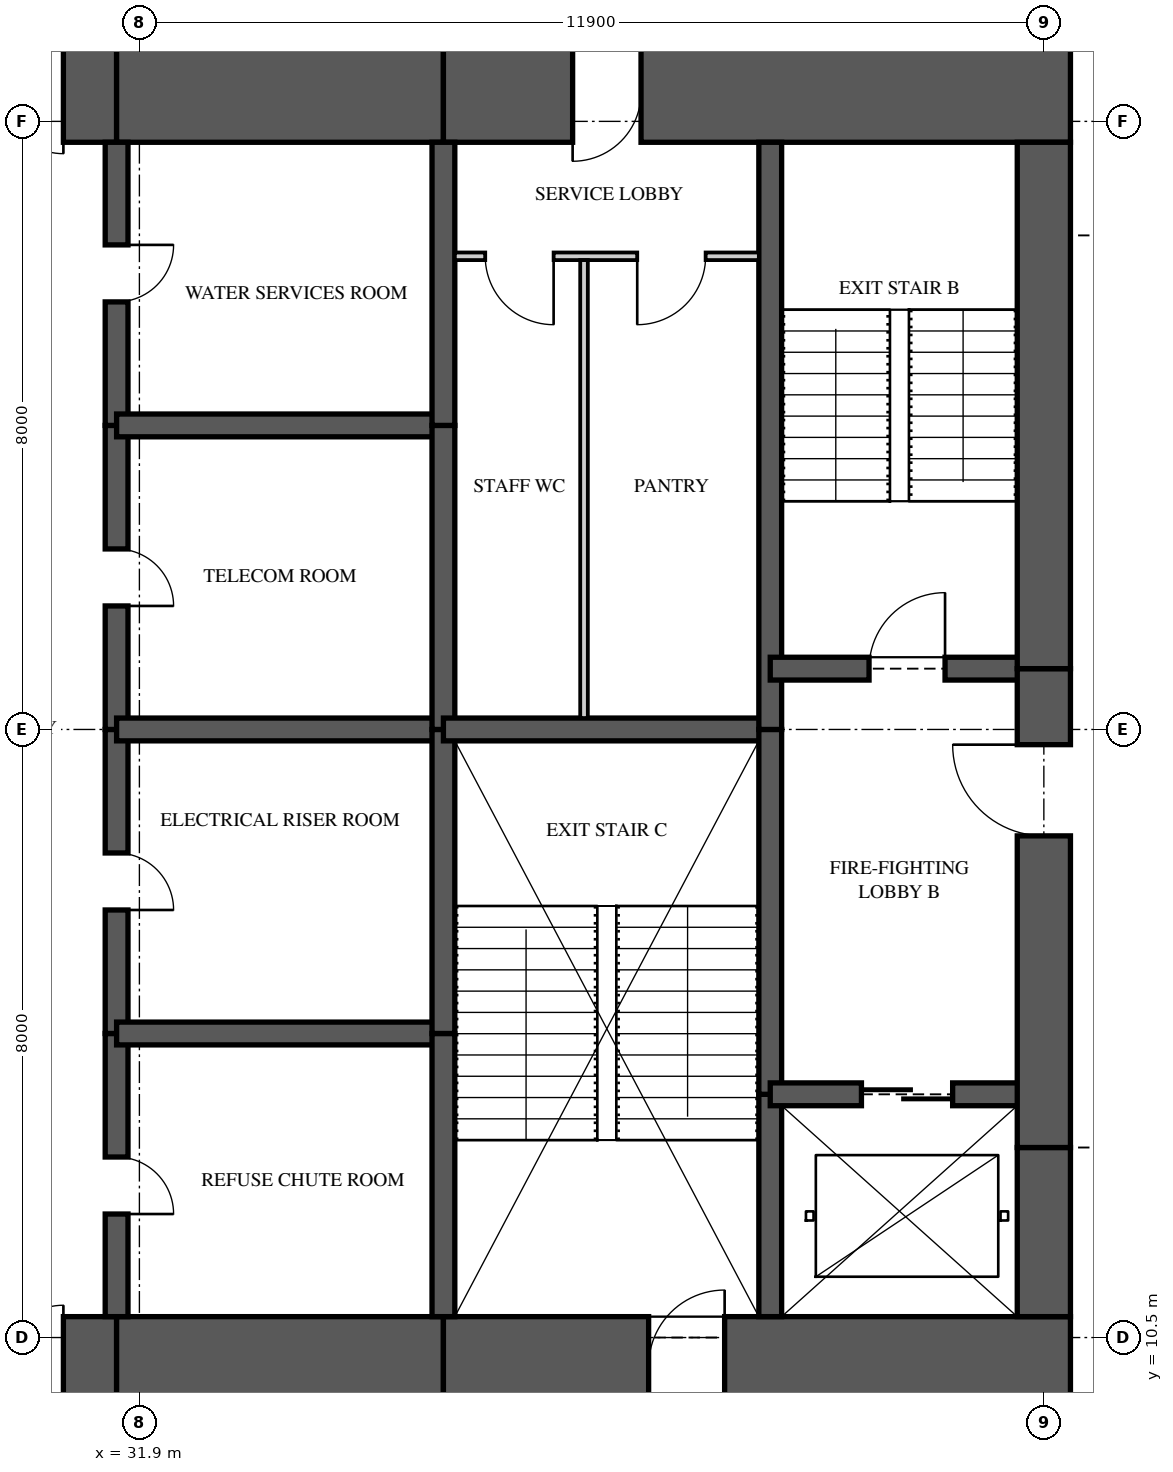
"""IFC4 building model, lengths in metres.
Left out: names, types, materials, properties, quantities, classifications, styles, units other than length and angle.
Written with IfcOpenShell. Run it as: python <this file> out.ifc"""

import sys

from ifc_helpers import new_model, si_unit, direction, frame, frame_2d, origin, place, context, subcontext, project, spatial, rectangle, extrude, element, fill, save


model = new_model("IFC4")
c1 = context("Model", 3, precision=1e-05, world=origin(), true_north=direction((0.0, 1.0)))
c2 = subcontext(c1, "Body", "Model", "MODEL_VIEW")
j1 = project(units=[si_unit("LENGTHUNIT", "METRE"), si_unit("PLANEANGLEUNIT", "RADIAN")], contexts=[c1])
p1 = place(None, origin())
s1 = spatial("IfcSite", under=j1, at=p1, CompositionType="ELEMENT")
p2 = place(p1, origin())
s2 = spatial("IfcBuilding", under=s1, at=p2, CompositionType="ELEMENT")
p3 = place(p2, frame((0.0, 0.0, 154.35)))
s3 = spatial("IfcBuildingStorey", under=s2, at=p3, CompositionType="ELEMENT", Elevation=154.35)
p4 = place(p3, frame((26.0, 10.125, 0.0), z_axis=(0.0, 0.0, 1.0), x_axis=(1.0, 0.0, 0.0)))
e1 = element("IfcWall", 1, at=p4, inside=s3, PredefinedType="SHEAR", context=c2, shape_type="SweptSolid", body=[
    extrude(rectangle(XDim=5.6, YDim=1.3, at=frame_2d((2.8, 0.0))), origin(), (0.0, 0.0, 1.0), 3.35),
])
p5 = place(p4, frame((3.3, 0.0, 0.0)))
e2 = element("IfcOpeningElement", 2, at=p5, cuts=e1, PredefinedType="OPENING", context=c2, shape_type="SweptSolid", body=[
    extrude(rectangle(XDim=1.6, YDim=2.1, at=frame_2d((0.8, 1.05))), frame((0.0, 0.66, 0.0), z_axis=(0.0, -1.0, 0.0), x_axis=(1.0, 0.0, 0.0)), (0.0, 0.0, 1.0), 1.32),
])
p6 = place(p3, frame((31.6, 10.125, 0.0), z_axis=(0.0, 0.0, 1.0), x_axis=(1.0, 0.0, 0.0)))
e3 = element("IfcWall", 3, at=p6, inside=s3, PredefinedType="SHEAR", context=c2, shape_type="SweptSolid", body=[
    extrude(rectangle(XDim=4.3, YDim=1.3, at=frame_2d((2.15, 0.0))), origin(), (0.0, 0.0, 1.0), 3.35),
])
p7 = place(p3, frame((35.9, 10.125, 0.0), z_axis=(0.0, 0.0, 1.0), x_axis=(1.0, 0.0, 0.0)))
e4 = element("IfcWall", 4, at=p7, inside=s3, PredefinedType="SHEAR", context=c2, shape_type="SweptSolid", body=[
    extrude(rectangle(XDim=8.25, YDim=1.3, at=frame_2d((4.125, 0.0))), origin(), (0.0, 0.0, 1.0), 3.35),
])
p8 = place(p7, frame((2.7, 0.0, 0.0)))
e5 = element("IfcOpeningElement", 5, at=p8, cuts=e4, PredefinedType="OPENING", context=c2, shape_type="SweptSolid", body=[
    extrude(rectangle(XDim=1.0, YDim=2.1, at=frame_2d((0.5, 1.05))), frame((0.0, 0.66, 0.0), z_axis=(0.0, -1.0, 0.0), x_axis=(1.0, 0.0, 0.0)), (0.0, 0.0, 1.0), 1.32),
])
p9 = place(p3, frame((44.15, 26.875, 0.0), z_axis=(0.0, 0.0, 1.0), x_axis=(-1.0, 0.0, 0.0)))
e6 = element("IfcWall", 6, at=p9, inside=s3, PredefinedType="SHEAR", context=c2, shape_type="SweptSolid", body=[
    extrude(rectangle(XDim=8.25, YDim=1.3, at=frame_2d((4.125, 0.0))), origin(), (0.0, 0.0, 1.0), 3.35),
])
p10 = place(p9, frame((5.65, 0.0, 0.0)))
e7 = element("IfcOpeningElement", 7, at=p10, cuts=e6, PredefinedType="OPENING", context=c2, shape_type="SweptSolid", body=[
    extrude(rectangle(XDim=0.9, YDim=2.1, at=frame_2d((0.45, 1.05))), frame((0.0, 0.66, 0.0), z_axis=(0.0, -1.0, 0.0), x_axis=(1.0, 0.0, 0.0)), (0.0, 0.0, 1.0), 1.32),
])
p11 = place(p3, frame((35.9, 26.875, 0.0), z_axis=(0.0, 0.0, 1.0), x_axis=(-1.0, 0.0, 0.0)))
e8 = element("IfcWall", 8, at=p11, inside=s3, PredefinedType="SHEAR", context=c2, shape_type="SweptSolid", body=[
    extrude(rectangle(XDim=4.3, YDim=1.3, at=frame_2d((2.15, 0.0))), origin(), (0.0, 0.0, 1.0), 3.35),
])
p12 = place(p3, frame((31.6, 26.875, 0.0), z_axis=(0.0, 0.0, 1.0), x_axis=(-1.0, 0.0, 0.0)))
e9 = element("IfcWall", 9, at=p12, inside=s3, PredefinedType="SHEAR", context=c2, shape_type="SweptSolid", body=[
    extrude(rectangle(XDim=5.6, YDim=1.3, at=frame_2d((2.8, 0.0))), origin(), (0.0, 0.0, 1.0), 3.35),
])
p13 = place(p12, frame((0.7, 0.0, 0.0)))
e10 = element("IfcOpeningElement", 10, at=p13, cuts=e9, PredefinedType="OPENING", context=c2, shape_type="SweptSolid", body=[
    extrude(rectangle(XDim=1.6, YDim=2.1, at=frame_2d((0.8, 1.05))), frame((0.0, 0.66, 0.0), z_axis=(0.0, -1.0, 0.0), x_axis=(1.0, 0.0, 0.0)), (0.0, 0.0, 1.0), 1.32),
])
p14 = place(p3, frame((43.8, 10.775, 0.0), z_axis=(0.0, 0.0, 1.0), x_axis=(0.0, 1.0, 0.0)))
e11 = element("IfcWall", 11, at=p14, inside=s3, PredefinedType="SHEAR", context=c2, shape_type="SweptSolid", body=[
    extrude(rectangle(XDim=2.225, YDim=0.7, at=frame_2d((1.113, 0.0))), origin(), (0.0, 0.0, 1.0), 3.35),
])
p15 = place(p3, frame((43.8, 13.0, 0.0), z_axis=(0.0, 0.0, 1.0), x_axis=(0.0, 1.0, 0.0)))
e12 = element("IfcWall", 12, at=p15, inside=s3, PredefinedType="SHEAR", context=c2, shape_type="SweptSolid", body=[
    extrude(rectangle(XDim=6.3, YDim=0.7, at=frame_2d((3.15, 0.0))), origin(), (0.0, 0.0, 1.0), 3.35),
])
p16 = place(p15, frame((4.1, 0.0, 0.0)))
e13 = element("IfcOpeningElement", 13, at=p16, cuts=e12, PredefinedType="OPENING", context=c2, shape_type="SweptSolid", body=[
    extrude(rectangle(XDim=1.2, YDim=2.2, at=frame_2d((0.6, 1.1))), frame((0.0, 0.36, 0.0), z_axis=(0.0, -1.0, 0.0), x_axis=(1.0, 0.0, 0.0)), (0.0, 0.0, 1.0), 0.72),
])
p17 = place(p3, frame((43.8, 19.3, 0.0), z_axis=(0.0, 0.0, 1.0), x_axis=(0.0, 1.0, 0.0)))
e14 = element("IfcWall", 14, at=p17, inside=s3, PredefinedType="SHEAR", context=c2, shape_type="SweptSolid", body=[
    extrude(rectangle(XDim=6.925, YDim=0.7, at=frame_2d((3.462, 0.0))), origin(), (0.0, 0.0, 1.0), 3.35),
])
p18 = place(p3, frame((31.6, 10.775, 0.0), z_axis=(0.0, 0.0, 1.0), x_axis=(0.0, 1.0, 0.0)))
e15 = element("IfcWall", 15, at=p18, inside=s3, PredefinedType="SHEAR", context=c2, shape_type="SweptSolid", body=[
    extrude(rectangle(XDim=3.725, YDim=0.3, at=frame_2d((1.863, 0.0))), origin(), (0.0, 0.0, 1.0), 3.35),
])
p19 = place(p18, frame((1.35, 0.0, 0.0)))
e16 = element("IfcOpeningElement", 16, at=p19, cuts=e15, PredefinedType="OPENING", context=c2, shape_type="SweptSolid", body=[
    extrude(rectangle(XDim=0.75, YDim=2.1, at=frame_2d((0.375, 1.05))), frame((0.0, 0.16, 0.0), z_axis=(0.0, -1.0, 0.0), x_axis=(1.0, 0.0, 0.0)), (0.0, 0.0, 1.0), 0.32),
])
p20 = place(p3, frame((31.6, 14.5, 0.0), z_axis=(0.0, 0.0, 1.0), x_axis=(0.0, 1.0, 0.0)))
e17 = element("IfcWall", 17, at=p20, inside=s3, PredefinedType="SHEAR", context=c2, shape_type="SweptSolid", body=[
    extrude(rectangle(XDim=4.0, YDim=0.3, at=frame_2d((2.0, 0.0))), origin(), (0.0, 0.0, 1.0), 3.35),
])
p21 = place(p20, frame((1.625, 0.0, 0.0)))
e18 = element("IfcOpeningElement", 18, at=p21, cuts=e17, PredefinedType="OPENING", context=c2, shape_type="SweptSolid", body=[
    extrude(rectangle(XDim=0.75, YDim=2.1, at=frame_2d((0.375, 1.05))), frame((0.0, 0.16, 0.0), z_axis=(0.0, -1.0, 0.0), x_axis=(1.0, 0.0, 0.0)), (0.0, 0.0, 1.0), 0.32),
])
p22 = place(p3, frame((31.6, 18.5, 0.0), z_axis=(0.0, 0.0, 1.0), x_axis=(0.0, 1.0, 0.0)))
e19 = element("IfcWall", 19, at=p22, inside=s3, PredefinedType="SHEAR", context=c2, shape_type="SweptSolid", body=[
    extrude(rectangle(XDim=4.0, YDim=0.3, at=frame_2d((2.0, 0.0))), origin(), (0.0, 0.0, 1.0), 3.35),
])
p23 = place(p22, frame((1.625, 0.0, 0.0)))
e20 = element("IfcOpeningElement", 20, at=p23, cuts=e19, PredefinedType="OPENING", context=c2, shape_type="SweptSolid", body=[
    extrude(rectangle(XDim=0.75, YDim=2.1, at=frame_2d((0.375, 1.05))), frame((0.0, 0.16, 0.0), z_axis=(0.0, -1.0, 0.0), x_axis=(1.0, 0.0, 0.0)), (0.0, 0.0, 1.0), 0.32),
])
p24 = place(p3, frame((31.6, 22.5, 0.0), z_axis=(0.0, 0.0, 1.0), x_axis=(0.0, 1.0, 0.0)))
e21 = element("IfcWall", 21, at=p24, inside=s3, PredefinedType="SHEAR", context=c2, shape_type="SweptSolid", body=[
    extrude(rectangle(XDim=3.725, YDim=0.3, at=frame_2d((1.863, 0.0))), origin(), (0.0, 0.0, 1.0), 3.35),
])
p25 = place(p24, frame((1.625, 0.0, 0.0)))
e22 = element("IfcOpeningElement", 22, at=p25, cuts=e21, PredefinedType="OPENING", context=c2, shape_type="SweptSolid", body=[
    extrude(rectangle(XDim=0.75, YDim=2.1, at=frame_2d((0.375, 1.05))), frame((0.0, 0.16, 0.0), z_axis=(0.0, -1.0, 0.0), x_axis=(1.0, 0.0, 0.0)), (0.0, 0.0, 1.0), 0.32),
])
p26 = place(p3, frame((35.9, 10.775, 0.0), z_axis=(0.0, 0.0, 1.0), x_axis=(0.0, 1.0, 0.0)))
e23 = element("IfcWall", 23, at=p26, inside=s3, PredefinedType="SHEAR", context=c2, shape_type="SweptSolid", body=[
    extrude(rectangle(XDim=3.725, YDim=0.3, at=frame_2d((1.863, 0.0))), origin(), (0.0, 0.0, 1.0), 3.35),
])
for number, where, z_axis, x_axis in (
    (24, (35.9, 14.5, 0.0), (0.0, 0.0, 1.0), (0.0, 1.0, 0.0)),
    (25, (35.9, 18.5, 0.0), (0.0, 0.0, 1.0), (0.0, 1.0, 0.0)),
):
    element("IfcWall", number, at=place(p3, frame(where, z_axis=z_axis, x_axis=x_axis)), inside=s3, PredefinedType="SHEAR", context=c2, shape_type="SweptSolid", body=[
        extrude(rectangle(XDim=4.0, YDim=0.3, at=frame_2d((2.0, 0.0))), origin(), (0.0, 0.0, 1.0), 3.35),
    ])
p27 = place(p3, frame((35.9, 22.5, 0.0), z_axis=(0.0, 0.0, 1.0), x_axis=(0.0, 1.0, 0.0)))
e26 = element("IfcWall", 26, at=p27, inside=s3, PredefinedType="SHEAR", context=c2, shape_type="SweptSolid", body=[
    extrude(rectangle(XDim=3.725, YDim=0.3, at=frame_2d((1.863, 0.0))), origin(), (0.0, 0.0, 1.0), 3.35),
])
p28 = place(p3, frame((40.2, 10.775, 0.0), z_axis=(0.0, 0.0, 1.0), x_axis=(0.0, 1.0, 0.0)))
e27 = element("IfcWall", 27, at=p28, inside=s3, PredefinedType="SHEAR", context=c2, shape_type="SweptSolid", body=[
    extrude(rectangle(XDim=2.925, YDim=0.3, at=frame_2d((1.462, 0.0))), origin(), (0.0, 0.0, 1.0), 3.35),
])
p29 = place(p3, frame((40.2, 13.7, 0.0), z_axis=(0.0, 0.0, 1.0), x_axis=(0.0, 1.0, 0.0)))
e28 = element("IfcWall", 28, at=p29, inside=s3, PredefinedType="SHEAR", context=c2, shape_type="SweptSolid", body=[
    extrude(rectangle(XDim=4.8, YDim=0.3, at=frame_2d((2.4, 0.0))), origin(), (0.0, 0.0, 1.0), 3.35),
])
p30 = place(p3, frame((40.2, 18.5, 0.0), z_axis=(0.0, 0.0, 1.0), x_axis=(0.0, 1.0, 0.0)))
e29 = element("IfcWall", 29, at=p30, inside=s3, PredefinedType="SHEAR", context=c2, shape_type="SweptSolid", body=[
    extrude(rectangle(XDim=7.725, YDim=0.3, at=frame_2d((3.863, 0.0))), origin(), (0.0, 0.0, 1.0), 3.35),
])
for number, where, z_axis, x_axis in (
    (30, (31.6, 14.5, 0.0), (0.0, 0.0, 1.0), (1.0, 0.0, 0.0)),
    (31, (31.6, 18.5, 0.0), (0.0, 0.0, 1.0), (1.0, 0.0, 0.0)),
    (32, (31.6, 22.5, 0.0), (0.0, 0.0, 1.0), (1.0, 0.0, 0.0)),
):
    element("IfcWall", number, at=place(p3, frame(where, z_axis=z_axis, x_axis=x_axis)), inside=s3, PredefinedType="SHEAR", context=c2, shape_type="SweptSolid", body=[
        extrude(rectangle(XDim=4.3, YDim=0.3, at=frame_2d((2.15, 0.0))), origin(), (0.0, 0.0, 1.0), 3.35),
    ])
p31 = place(p3, frame((35.9, 18.5, 0.0), z_axis=(0.0, 0.0, 1.0), x_axis=(1.0, 0.0, 0.0)))
e33 = element("IfcWall", 33, at=p31, inside=s3, PredefinedType="SHEAR", context=c2, shape_type="SweptSolid", body=[
    extrude(rectangle(XDim=4.3, YDim=0.3, at=frame_2d((2.15, 0.0))), origin(), (0.0, 0.0, 1.0), 3.35),
])
p32 = place(p3, frame((40.2, 13.7, 0.0), z_axis=(0.0, 0.0, 1.0), x_axis=(1.0, 0.0, 0.0)))
e34 = element("IfcWall", 34, at=p32, inside=s3, PredefinedType="SHEAR", context=c2, shape_type="SweptSolid", body=[
    extrude(rectangle(XDim=3.6, YDim=0.3, at=frame_2d((1.8, 0.0))), origin(), (0.0, 0.0, 1.0), 3.35),
])
p33 = place(p32, frame((1.2, 0.0, 0.0)))
e35 = element("IfcOpeningElement", 35, at=p33, cuts=e34, PredefinedType="OPENING", context=c2, shape_type="SweptSolid", body=[
    extrude(rectangle(XDim=1.2, YDim=2.1, at=frame_2d((0.6, 1.05))), frame((0.0, 0.16, 0.0), z_axis=(0.0, -1.0, 0.0), x_axis=(1.0, 0.0, 0.0)), (0.0, 0.0, 1.0), 0.32),
])
p34 = place(p3, frame((40.2, 19.3, 0.0), z_axis=(0.0, 0.0, 1.0), x_axis=(1.0, 0.0, 0.0)))
e36 = element("IfcWall", 36, at=p34, inside=s3, PredefinedType="SHEAR", context=c2, shape_type="SweptSolid", body=[
    extrude(rectangle(XDim=3.6, YDim=0.3, at=frame_2d((1.8, 0.0))), origin(), (0.0, 0.0, 1.0), 3.35),
])
p35 = place(p34, frame((1.3, 0.0, 0.0)))
e37 = element("IfcOpeningElement", 37, at=p35, cuts=e36, PredefinedType="OPENING", context=c2, shape_type="SweptSolid", body=[
    extrude(rectangle(XDim=1.0, YDim=2.1, at=frame_2d((0.5, 1.05))), frame((0.0, 0.16, 0.0), z_axis=(0.0, -1.0, 0.0), x_axis=(1.0, 0.0, 0.0)), (0.0, 0.0, 1.0), 0.32),
])
p36 = place(p3, frame((36.05, 24.725, 0.0), z_axis=(0.0, 0.0, 1.0), x_axis=(1.0, 0.0, 0.0)))
e38 = element("IfcWall", 38, at=p36, inside=s3, PredefinedType="PARTITIONING", context=c2, shape_type="SweptSolid", body=[
    extrude(rectangle(XDim=4.0, YDim=0.1, at=frame_2d((2.0, 0.0))), origin(), (0.0, 0.0, 1.0), 3.11),
])
p37 = place(p36, frame((0.4, 0.0, 0.0)))
e39 = element("IfcOpeningElement", 39, at=p37, cuts=e38, PredefinedType="OPENING", context=c2, shape_type="SweptSolid", body=[
    extrude(rectangle(XDim=0.9, YDim=2.1, at=frame_2d((0.45, 1.05))), frame((0.0, 0.06, 0.0), z_axis=(0.0, -1.0, 0.0), x_axis=(1.0, 0.0, 0.0)), (0.0, 0.0, 1.0), 0.12),
])
p38 = place(p36, frame((2.4, 0.0, 0.0)))
e40 = element("IfcOpeningElement", 40, at=p38, cuts=e38, PredefinedType="OPENING", context=c2, shape_type="SweptSolid", body=[
    extrude(rectangle(XDim=0.9, YDim=2.1, at=frame_2d((0.45, 1.05))), frame((0.0, 0.06, 0.0), z_axis=(0.0, -1.0, 0.0), x_axis=(1.0, 0.0, 0.0)), (0.0, 0.0, 1.0), 0.12),
])
p39 = place(p3, frame((37.75, 18.65, 0.0), z_axis=(0.0, 0.0, 1.0), x_axis=(0.0, 1.0, 0.0)))
e41 = element("IfcWall", 41, at=p39, inside=s3, PredefinedType="PARTITIONING", context=c2, shape_type="SweptSolid", body=[
    extrude(rectangle(XDim=6.025, YDim=0.1, at=frame_2d((3.013, 0.0))), origin(), (0.0, 0.0, 1.0), 3.11),
])
p40 = place(p37, frame((0.9, 0.0, 0.0), z_axis=(0.0, 0.0, 1.0), x_axis=(-1.0, 0.0, 0.0)))
e42 = element("IfcDoor", 42, at=p40, inside=s3, OperationType="SINGLE_SWING_LEFT", PredefinedType="DOOR", context=c2, shape_type="SweptSolid", body=[
    extrude(rectangle(XDim=0.9, YDim=2.1, at=frame_2d((0.45, 1.05))), frame((0.0, 0.025, 0.0), z_axis=(0.0, -1.0, 0.0), x_axis=(1.0, 0.0, 0.0)), (0.0, 0.0, 1.0), 0.05),
])
fill(e39, e42)
p41 = place(p38, frame((0.9, 0.0, 0.0), z_axis=(0.0, 0.0, 1.0), x_axis=(-1.0, 0.0, 0.0)))
e43 = element("IfcDoor", 43, at=p41, inside=s3, OperationType="SINGLE_SWING_RIGHT", PredefinedType="DOOR", context=c2, shape_type="SweptSolid", body=[
    extrude(rectangle(XDim=0.9, YDim=2.1, at=frame_2d((0.45, 1.05))), frame((0.0, 0.025, 0.0), z_axis=(0.0, -1.0, 0.0), x_axis=(1.0, 0.0, 0.0)), (0.0, 0.0, 1.0), 0.05),
])
fill(e40, e43)
p42 = place(p35, origin())
e44 = element("IfcDoor", 44, at=p42, inside=s3, OperationType="SINGLE_SWING_RIGHT", PredefinedType="DOOR", context=c2, shape_type="SweptSolid", body=[
    extrude(rectangle(XDim=1.0, YDim=2.1, at=frame_2d((0.5, 1.05))), frame((0.0, 0.025, 0.0), z_axis=(0.0, -1.0, 0.0), x_axis=(1.0, 0.0, 0.0)), (0.0, 0.0, 1.0), 0.05),
])
fill(e37, e44)
p43 = place(p16, origin())
e45 = element("IfcDoor", 45, at=p43, inside=s3, OperationType="SINGLE_SWING_RIGHT", PredefinedType="DOOR", context=c2, shape_type="SweptSolid", body=[
    extrude(rectangle(XDim=1.2, YDim=2.2, at=frame_2d((0.6, 1.1))), frame((0.0, 0.025, 0.0), z_axis=(0.0, -1.0, 0.0), x_axis=(1.0, 0.0, 0.0)), (0.0, 0.0, 1.0), 0.05),
])
fill(e13, e45)
p44 = place(p33, origin())
e46 = element("IfcDoor", 46, at=p44, inside=s3, OperationType="SLIDING_TO_LEFT", PredefinedType="DOOR", context=c2, shape_type="SweptSolid", body=[
    extrude(rectangle(XDim=1.2, YDim=2.1, at=frame_2d((0.6, 1.05))), frame((0.0, 0.025, 0.0), z_axis=(0.0, -1.0, 0.0), x_axis=(1.0, 0.0, 0.0)), (0.0, 0.0, 1.0), 0.05),
])
fill(e35, e46)
p45 = place(p5, origin())
e47 = element("IfcDoor", 47, at=p45, inside=s3, OperationType="DOUBLE_DOOR_SINGLE_SWING", PredefinedType="DOOR", context=c2, shape_type="SweptSolid", body=[
    extrude(rectangle(XDim=1.6, YDim=2.1, at=frame_2d((0.8, 1.05))), frame((0.0, 0.025, 0.0), z_axis=(0.0, -1.0, 0.0), x_axis=(1.0, 0.0, 0.0)), (0.0, 0.0, 1.0), 0.05),
])
fill(e2, e47)
p46 = place(p13, origin())
e48 = element("IfcDoor", 48, at=p46, inside=s3, OperationType="DOUBLE_DOOR_SINGLE_SWING", PredefinedType="DOOR", context=c2, shape_type="SweptSolid", body=[
    extrude(rectangle(XDim=1.6, YDim=2.1, at=frame_2d((0.8, 1.05))), frame((0.0, 0.025, 0.0), z_axis=(0.0, -1.0, 0.0), x_axis=(1.0, 0.0, 0.0)), (0.0, 0.0, 1.0), 0.05),
])
fill(e10, e48)
p47 = place(p19, frame((0.75, 0.0, 0.0), z_axis=(0.0, 0.0, 1.0), x_axis=(-1.0, 0.0, 0.0)))
e49 = element("IfcDoor", 49, at=p47, inside=s3, OperationType="SINGLE_SWING_RIGHT", PredefinedType="DOOR", context=c2, shape_type="SweptSolid", body=[
    extrude(rectangle(XDim=0.75, YDim=2.1, at=frame_2d((0.375, 1.05))), frame((0.0, 0.025, 0.0), z_axis=(0.0, -1.0, 0.0), x_axis=(1.0, 0.0, 0.0)), (0.0, 0.0, 1.0), 0.05),
])
fill(e16, e49)
p48 = place(p21, frame((0.75, 0.0, 0.0), z_axis=(0.0, 0.0, 1.0), x_axis=(-1.0, 0.0, 0.0)))
e50 = element("IfcDoor", 50, at=p48, inside=s3, OperationType="SINGLE_SWING_RIGHT", PredefinedType="DOOR", context=c2, shape_type="SweptSolid", body=[
    extrude(rectangle(XDim=0.75, YDim=2.1, at=frame_2d((0.375, 1.05))), frame((0.0, 0.025, 0.0), z_axis=(0.0, -1.0, 0.0), x_axis=(1.0, 0.0, 0.0)), (0.0, 0.0, 1.0), 0.05),
])
fill(e18, e50)
p49 = place(p23, frame((0.75, 0.0, 0.0), z_axis=(0.0, 0.0, 1.0), x_axis=(-1.0, 0.0, 0.0)))
e51 = element("IfcDoor", 51, at=p49, inside=s3, OperationType="SINGLE_SWING_RIGHT", PredefinedType="DOOR", context=c2, shape_type="SweptSolid", body=[
    extrude(rectangle(XDim=0.75, YDim=2.1, at=frame_2d((0.375, 1.05))), frame((0.0, 0.025, 0.0), z_axis=(0.0, -1.0, 0.0), x_axis=(1.0, 0.0, 0.0)), (0.0, 0.0, 1.0), 0.05),
])
fill(e20, e51)
p50 = place(p25, frame((0.75, 0.0, 0.0), z_axis=(0.0, 0.0, 1.0), x_axis=(-1.0, 0.0, 0.0)))
e52 = element("IfcDoor", 52, at=p50, inside=s3, OperationType="SINGLE_SWING_LEFT", PredefinedType="DOOR", context=c2, shape_type="SweptSolid", body=[
    extrude(rectangle(XDim=0.75, YDim=2.1, at=frame_2d((0.375, 1.05))), frame((0.0, 0.025, 0.0), z_axis=(0.0, -1.0, 0.0), x_axis=(1.0, 0.0, 0.0)), (0.0, 0.0, 1.0), 0.05),
])
fill(e22, e52)
p51 = place(p8, origin())
e53 = element("IfcDoor", 53, at=p51, inside=s3, OperationType="SINGLE_SWING_RIGHT", PredefinedType="DOOR", context=c2, shape_type="SweptSolid", body=[
    extrude(rectangle(XDim=1.0, YDim=2.1, at=frame_2d((0.5, 1.05))), frame((0.0, 0.025, 0.0), z_axis=(0.0, -1.0, 0.0), x_axis=(1.0, 0.0, 0.0)), (0.0, 0.0, 1.0), 0.05),
])
fill(e5, e53)
p52 = place(p10, origin())
e54 = element("IfcDoor", 54, at=p52, inside=s3, OperationType="SINGLE_SWING_RIGHT", PredefinedType="DOOR", context=c2, shape_type="SweptSolid", body=[
    extrude(rectangle(XDim=0.9, YDim=2.1, at=frame_2d((0.45, 1.05))), frame((0.0, 0.47, 0.0), z_axis=(0.0, -1.0, 0.0), x_axis=(1.0, 0.0, 0.0)), (0.0, 0.0, 1.0), 0.8),
])
fill(e7, e54)
save(model, sys.argv[1])
